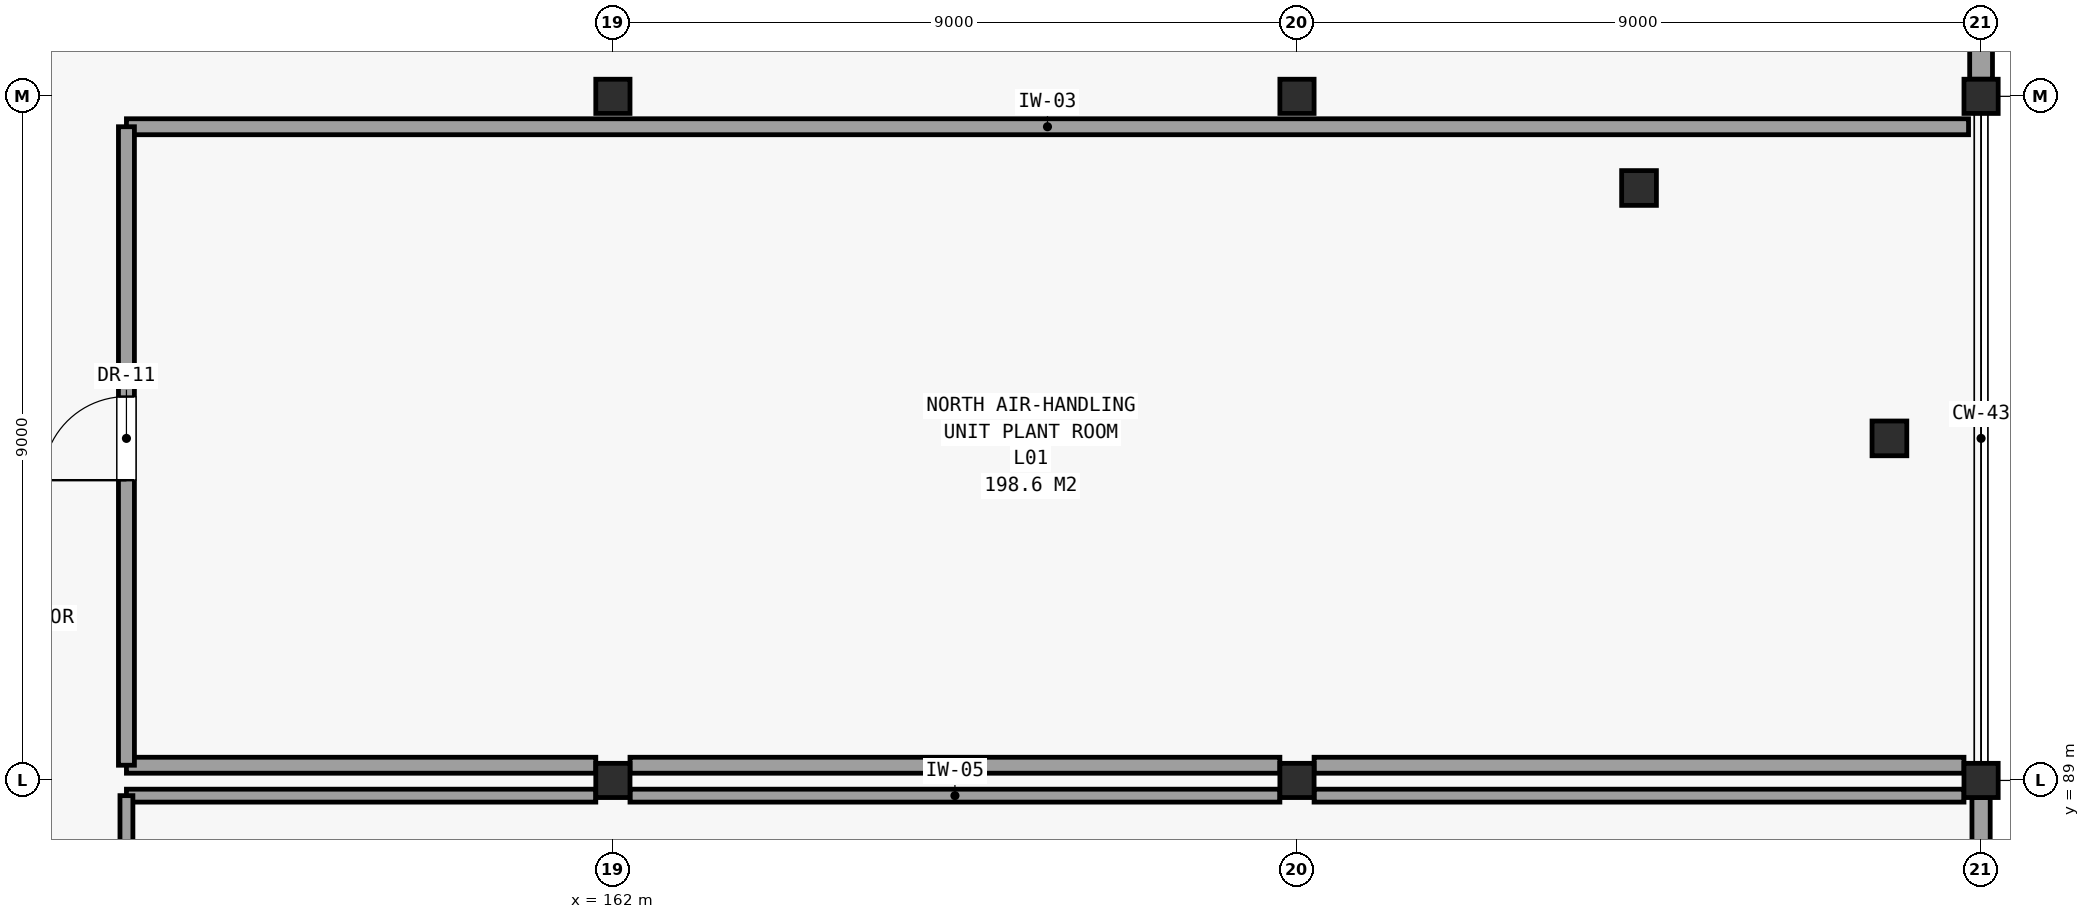
"""IFC4 building model, lengths in metres.
Left out: names, types, materials, properties, quantities, classifications, styles, units other than length and angle.
Written with IfcOpenShell. Run it as: python <this file> out.ifc"""

import sys

from ifc_helpers import new_model, si_unit, direction, frame, frame_2d, origin, origin_2d, place, context, subcontext, project, spatial, rectangle, hollow_rectangle, hollow_circle, extrude, element, fill, save


model = new_model("IFC4")
c1 = context("Model", 3, precision=1e-05, world=origin(), true_north=direction((0.0, 1.0)))
c2 = subcontext(c1, "Body", "Model", "MODEL_VIEW")
j1 = project(units=[si_unit("LENGTHUNIT", "METRE"), si_unit("PLANEANGLEUNIT", "RADIAN")], contexts=[c1])
p1 = place(None, origin())
s1 = spatial("IfcSite", under=j1, at=p1, CompositionType="ELEMENT")
p2 = place(p1, origin())
s2 = spatial("IfcBuilding", under=s1, at=p2, CompositionType="ELEMENT")
p3 = place(p2, frame((0.0, 0.0, 5.1)))
s3 = spatial("IfcBuildingStorey", under=s2, at=p3, CompositionType="ELEMENT", Elevation=5.1)
for number, where, z_axis, x_axis in (
    (1, (162.0, 89.0, 0.0), (0.0, 0.0, 1.0), (1.0, 0.0, 0.0)),
    (2, (162.0, 98.0, 0.0), (0.0, 0.0, 1.0), (1.0, 0.0, 0.0)),
    (3, (171.0, 89.0, 0.0), (0.0, 0.0, 1.0), (1.0, 0.0, 0.0)),
    (4, (171.0, 98.0, 0.0), (0.0, 0.0, 1.0), (1.0, 0.0, 0.0)),
):
    element("IfcColumn", number, at=place(p3, frame(where, z_axis=z_axis, x_axis=x_axis)), inside=s3, PredefinedType="COLUMN", context=c2, shape_type="SweptSolid", body=[
        extrude(hollow_rectangle(XDim=0.45, YDim=0.45, WallThickness=0.022, at=origin_2d()), origin(), (0.0, 0.0, 1.0), 4.2),
    ])
for number, where, z_axis, x_axis in (
    (5, (175.5, 96.794, 0.0), (0.0, 0.0, 1.0), (1.0, 0.0, 0.0)),
    (6, (178.794, 93.5, 0.0), (0.0, 0.0, 1.0), (1.0, 0.0, 0.0)),
):
    element("IfcColumn", number, at=place(p3, frame(where, z_axis=z_axis, x_axis=x_axis)), inside=s3, PredefinedType="COLUMN", context=c2, shape_type="SweptSolid", body=[
        extrude(hollow_circle(Radius=0.229, WallThickness=0.016, at=origin_2d()), origin(), (0.0, 0.0, 1.0), 4.2),
    ])
for number, where, z_axis, x_axis in (
    (7, (180.0, 89.0, 0.0), (0.0, 0.0, 1.0), (1.0, 0.0, 0.0)),
    (8, (180.0, 98.0, 0.0), (0.0, 0.0, 1.0), (1.0, 0.0, 0.0)),
):
    element("IfcColumn", number, at=place(p3, frame(where, z_axis=z_axis, x_axis=x_axis)), inside=s3, PredefinedType="COLUMN", context=c2, shape_type="SweptSolid", body=[
        extrude(hollow_rectangle(XDim=0.45, YDim=0.45, WallThickness=0.022, at=origin_2d()), origin(), (0.0, 0.0, 1.0), 4.2),
    ])
p4 = place(p3, frame((180.0, 80.225, 0.0), z_axis=(0.0, 0.0, 1.0), x_axis=(0.0, 1.0, 0.0)))
e9 = element("IfcWall", 9, at=p4, inside=s3, PredefinedType="SOLIDWALL", context=c2, shape_type="SweptSolid", body=[
    extrude(rectangle(XDim=8.55, YDim=0.24, at=frame_2d((4.275, 0.0))), origin(), (0.0, 0.0, 1.0), 3.3),
])
p5 = place(p4, frame((2.475, 0.0, 0.95)))
e10 = element("IfcOpeningElement", 10, at=p5, cuts=e9, PredefinedType="OPENING", context=c2, shape_type="SweptSolid", body=[
    extrude(rectangle(XDim=3.6, YDim=1.1, at=frame_2d((1.8, 0.55))), frame((0.0, 0.131, 0.0), z_axis=(0.0, -1.0, 0.0), x_axis=(1.0, 0.0, 0.0)), (0.0, 0.0, 1.0), 0.262),
])
p6 = place(p3, frame((180.0, 98.225, 0.0), z_axis=(0.0, 0.0, 1.0), x_axis=(0.0, 1.0, 0.0)))
e11 = element("IfcWall", 11, at=p6, inside=s3, PredefinedType="SOLIDWALL", context=c2, shape_type="SweptSolid", body=[
    extrude(rectangle(XDim=0.775, YDim=0.3, at=frame_2d((0.387, 0.0))), origin(), (0.0, 0.0, 1.0), 3.94),
])
p7 = place(p3, frame((155.6, 88.8, 0.0), z_axis=(0.0, 0.0, 1.0), x_axis=(1.0, 0.0, 0.0)))
e12 = element("IfcWall", 12, at=p7, inside=s3, PredefinedType="PARTITIONING", context=c2, shape_type="SweptSolid", body=[
    extrude(rectangle(XDim=6.175, YDim=0.17, at=frame_2d((3.087, 0.0))), origin(), (0.0, 0.0, 1.0), 3.3),
])
for number, where, z_axis, x_axis in (
    (13, (162.225, 88.8, 0.0), (0.0, 0.0, 1.0), (1.0, 0.0, 0.0)),
    (14, (171.225, 88.8, 0.0), (0.0, 0.0, 1.0), (1.0, 0.0, 0.0)),
):
    element("IfcWall", number, at=place(p3, frame(where, z_axis=z_axis, x_axis=x_axis)), inside=s3, PredefinedType="PARTITIONING", context=c2, shape_type="SweptSolid", body=[
        extrude(rectangle(XDim=8.55, YDim=0.17, at=frame_2d((4.275, 0.0))), origin(), (0.0, 0.0, 1.0), 3.3),
    ])
p8 = place(p3, frame((155.6, 62.2, 0.0), z_axis=(0.0, 0.0, 1.0), x_axis=(0.0, 1.0, 0.0)))
e15 = element("IfcWall", 15, at=p8, inside=s3, PredefinedType="PARTITIONING", context=c2, shape_type="SweptSolid", body=[
    extrude(rectangle(XDim=26.6, YDim=0.17, at=frame_2d((13.3, 0.0))), origin(), (0.0, 0.0, 1.0), 3.362),
])
p9 = place(p8, frame((12.85, 0.0, 0.0)))
e16 = element("IfcOpeningElement", 16, at=p9, cuts=e15, PredefinedType="OPENING", context=c2, shape_type="SweptSolid", body=[
    extrude(rectangle(XDim=0.9, YDim=2.15, at=frame_2d((0.45, 1.075))), frame((0.0, 0.096, 0.0), z_axis=(0.0, -1.0, 0.0), x_axis=(1.0, 0.0, 0.0)), (0.0, 0.0, 1.0), 0.192),
])
p10 = place(p3, frame((155.6, 89.2, 0.0), z_axis=(0.0, 0.0, 1.0), x_axis=(1.0, 0.0, 0.0)))
e17 = element("IfcWall", 17, at=p10, inside=s3, PredefinedType="PARTITIONING", context=c2, shape_type="SweptSolid", body=[
    extrude(rectangle(XDim=6.175, YDim=0.21, at=frame_2d((3.087, 0.0))), origin(), (0.0, 0.0, 1.0), 3.3),
])
for number, where, z_axis, x_axis in (
    (18, (162.225, 89.2, 0.0), (0.0, 0.0, 1.0), (1.0, 0.0, 0.0)),
    (19, (171.225, 89.2, 0.0), (0.0, 0.0, 1.0), (1.0, 0.0, 0.0)),
):
    element("IfcWall", number, at=place(p3, frame(where, z_axis=z_axis, x_axis=x_axis)), inside=s3, PredefinedType="PARTITIONING", context=c2, shape_type="SweptSolid", body=[
        extrude(rectangle(XDim=8.55, YDim=0.21, at=frame_2d((4.275, 0.0))), origin(), (0.0, 0.0, 1.0), 3.3),
    ])
p11 = place(p3, frame((155.6, 97.6, 0.0), z_axis=(0.0, 0.0, 1.0), x_axis=(1.0, 0.0, 0.0)))
e20 = element("IfcWall", 20, at=p11, inside=s3, PredefinedType="PARTITIONING", context=c2, shape_type="SweptSolid", body=[
    extrude(rectangle(XDim=24.235, YDim=0.21, at=frame_2d((12.117, 0.0))), origin(), (0.0, 0.0, 1.0), 3.3),
])
p12 = place(p3, frame((155.6, 89.2, 0.0), z_axis=(0.0, 0.0, 1.0), x_axis=(0.0, 1.0, 0.0)))
e21 = element("IfcWall", 21, at=p12, inside=s3, PredefinedType="PARTITIONING", context=c2, shape_type="SweptSolid", body=[
    extrude(rectangle(XDim=8.4, YDim=0.21, at=frame_2d((4.2, 0.0))), origin(), (0.0, 0.0, 1.0), 3.362),
])
p13 = place(p12, frame((3.75, 0.0, 0.0)))
e22 = element("IfcOpeningElement", 22, at=p13, cuts=e21, PredefinedType="OPENING", context=c2, shape_type="SweptSolid", body=[
    extrude(rectangle(XDim=1.1, YDim=2.15, at=frame_2d((0.55, 1.075))), frame((0.0, 0.116, 0.0), z_axis=(0.0, -1.0, 0.0), x_axis=(1.0, 0.0, 0.0)), (0.0, 0.0, 1.0), 0.232),
])
p14 = place(p13, origin())
e23 = element("IfcDoor", 23, at=p14, inside=s3, OperationType="SINGLE_SWING_LEFT", PredefinedType="DOOR", context=c2, shape_type="SweptSolid", body=[
    extrude(rectangle(XDim=1.1, YDim=2.15, at=frame_2d((0.55, 1.075))), frame((0.0, 0.025, 0.0), z_axis=(0.0, -1.0, 0.0), x_axis=(1.0, 0.0, 0.0)), (0.0, 0.0, 1.0), 0.05),
])
fill(e22, e23)
save(model, sys.argv[1])
